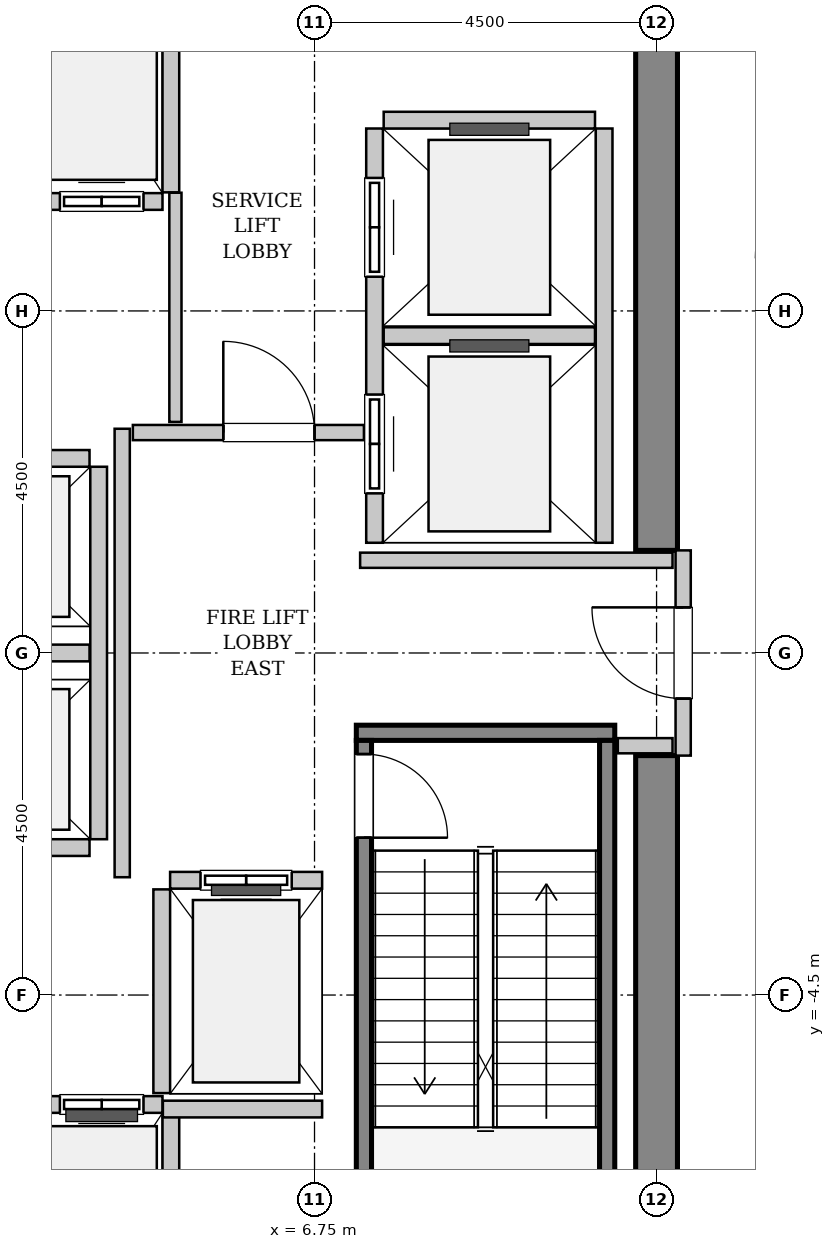
"""IFC4 building model, lengths in metres.
Left out: names, types, materials, properties, quantities, classifications, styles, units other than length and angle.
Written with IfcOpenShell. Run it as: python <this file> out.ifc"""

import sys

from ifc_helpers import new_model, si_unit, direction, frame, frame_2d, origin, place, context, subcontext, project, spatial, rectangle, extrude, source, transform, mapped, element, fill, save


model = new_model("IFC4")
c1 = context("Model", 3, precision=1e-05, world=origin(), true_north=direction((0.0, 1.0)))
c2 = subcontext(c1, "Body", "Model", "MODEL_VIEW")
j1 = project(units=[si_unit("LENGTHUNIT", "METRE"), si_unit("PLANEANGLEUNIT", "RADIAN")], contexts=[c1])
p1 = place(None, origin())
s1 = spatial("IfcSite", under=j1, at=p1, CompositionType="ELEMENT")
p2 = place(p1, origin())
s2 = spatial("IfcBuilding", under=s1, at=p2, CompositionType="ELEMENT")
p3 = place(p2, frame((0.0, 0.0, 144.0)))
s3 = spatial("IfcBuildingStorey", under=s2, at=p3, CompositionType="ELEMENT", Elevation=144.0)
m1 = source(origin(), c2, "Body", "SweptSolid", [
    extrude(rectangle(XDim=7.375, YDim=0.55, at=frame_2d((3.688, 0.0))), origin(), (0.0, 0.0, 1.0), 4.8),
])
for number, where, z_axis, x_axis in (
    (1, (11.25, -8.725, 0.0), (0.0, 0.0, 1.0), (0.0, 1.0, 0.0)),
    (2, (11.25, 1.35, 0.0), (0.0, 0.0, 1.0), (0.0, 1.0, 0.0)),
):
    element("IfcWall", number, at=place(p3, frame(where, z_axis=z_axis, x_axis=x_axis)), inside=s3, PredefinedType="SHEAR", context=c2, shape_type="MappedRepresentation", body=[
        mapped(m1, transform((0.0, 0.0, 0.0), x_axis=(1.0, 0.0, 0.0), y_axis=(0.0, 1.0, 0.0), z_axis=(0.0, 0.0, 1.0), scale=1.0)),
    ])
m2 = source(origin(), c2, "Body", "SweptSolid", [
    extrude(rectangle(XDim=3.4, YDim=0.2, at=frame_2d((1.7, 0.0))), origin(), (0.0, 0.0, 1.0), 4.8),
])
p4 = place(p3, frame((7.3, -1.05, 0.0), z_axis=(0.0, 0.0, 1.0), x_axis=(1.0, 0.0, 0.0)))
e3 = element("IfcWall", 3, at=p4, inside=s3, PredefinedType="SOLIDWALL", context=c2, shape_type="MappedRepresentation", body=[
    mapped(m2, transform((0.0, 0.0, 0.0), x_axis=(1.0, 0.0, 0.0), y_axis=(0.0, 1.0, 0.0), z_axis=(0.0, 0.0, 1.0), scale=1.0)),
])
m3 = source(origin(), c2, "Body", "SweptSolid", [
    extrude(rectangle(XDim=7.1, YDim=0.2, at=frame_2d((3.55, 0.0))), origin(), (0.0, 0.0, 1.0), 4.8),
])
p5 = place(p3, frame((7.4, -1.15, 0.0), z_axis=(0.0, 0.0, 1.0), x_axis=(0.0, -1.0, 0.0)))
e4 = element("IfcWall", 4, at=p5, inside=s3, PredefinedType="SOLIDWALL", context=c2, shape_type="MappedRepresentation", body=[
    mapped(m3, transform((0.0, 0.0, 0.0), x_axis=(1.0, 0.0, 0.0), y_axis=(0.0, 1.0, 0.0), z_axis=(0.0, 0.0, 1.0), scale=1.0)),
])
p6 = place(p5, frame((0.18, 0.0, 0.0)))
e5 = element("IfcOpeningElement", 5, at=p6, cuts=e4, PredefinedType="OPENING", context=c2, shape_type="SweptSolid", body=[
    extrude(rectangle(XDim=1.1, YDim=2.15, at=frame_2d((0.55, 1.075))), frame((0.0, 0.11, 0.0), z_axis=(0.0, -1.0, 0.0), x_axis=(1.0, 0.0, 0.0)), (0.0, 0.0, 1.0), 0.22),
])
p7 = place(p3, frame((10.6, -1.15, 0.0), z_axis=(0.0, 0.0, 1.0), x_axis=(0.0, -1.0, 0.0)))
e6 = element("IfcWall", 6, at=p7, inside=s3, PredefinedType="SOLIDWALL", context=c2, shape_type="MappedRepresentation", body=[
    mapped(m3, transform((0.0, 0.0, 0.0), x_axis=(1.0, 0.0, 0.0), y_axis=(0.0, 1.0, 0.0), z_axis=(0.0, 0.0, 1.0), scale=1.0)),
])
m4 = source(origin(), c2, "Body", "SweptSolid", [
    extrude(rectangle(XDim=2.0, YDim=0.22, at=frame_2d((1.0, 0.0))), origin(), (0.0, 0.0, 1.0), 4.535),
])
p8 = place(p3, frame((6.85, -2.99, 0.0), z_axis=(0.0, 0.0, 1.0), x_axis=(-1.0, 0.0, 0.0)))
e7 = element("IfcWall", 7, at=p8, inside=s3, PredefinedType="SOLIDWALL", context=c2, shape_type="MappedRepresentation", body=[
    mapped(m4, transform((0.0, 0.0, 0.0), x_axis=(1.0, 0.0, 0.0), y_axis=(0.0, 1.0, 0.0), z_axis=(0.0, 0.0, 1.0), scale=1.0)),
])
p9 = place(p8, frame((0.4, 0.0, 0.0)))
e8 = element("IfcOpeningElement", 8, at=p9, cuts=e7, PredefinedType="OPENING", context=c2, shape_type="SweptSolid", body=[
    extrude(rectangle(XDim=1.2, YDim=2.2, at=frame_2d((0.6, 1.1))), frame((0.0, 0.12, 0.0), z_axis=(0.0, -1.0, 0.0), x_axis=(1.0, 0.0, 0.0)), (0.0, 0.0, 1.0), 0.24),
])
m5 = source(origin(), c2, "Body", "SweptSolid", [
    extrude(rectangle(XDim=2.68, YDim=0.22, at=frame_2d((1.34, 0.0))), origin(), (0.0, 0.0, 1.0), 4.535),
])
p10 = place(p3, frame((4.74, -3.11, 0.0), z_axis=(0.0, 0.0, 1.0), x_axis=(0.0, -1.0, 0.0)))
e9 = element("IfcWall", 9, at=p10, inside=s3, PredefinedType="SOLIDWALL", context=c2, shape_type="MappedRepresentation", body=[
    mapped(m5, transform((0.0, 0.0, 0.0), x_axis=(1.0, 0.0, 0.0), y_axis=(0.0, 1.0, 0.0), z_axis=(0.0, 0.0, 1.0), scale=1.0)),
])
m6 = source(origin(), c2, "Body", "SweptSolid", [
    extrude(rectangle(XDim=5.45, YDim=0.22, at=frame_2d((2.725, 0.0))), origin(), (0.0, 0.0, 1.0), 4.535),
])
p11 = place(p3, frame((7.54, 6.9, 0.0), z_axis=(0.0, 0.0, 1.0), x_axis=(0.0, -1.0, 0.0)))
e10 = element("IfcWall", 10, at=p11, inside=s3, PredefinedType="SOLIDWALL", context=c2, shape_type="MappedRepresentation", body=[
    mapped(m6, transform((0.0, 0.0, 0.0), x_axis=(1.0, 0.0, 0.0), y_axis=(0.0, 1.0, 0.0), z_axis=(0.0, 0.0, 1.0), scale=1.0)),
])
p12 = place(p11, frame((3.5, 0.0, 0.0)))
e11 = element("IfcOpeningElement", 11, at=p12, cuts=e10, PredefinedType="OPENING", context=c2, shape_type="SweptSolid", body=[
    extrude(rectangle(XDim=1.3, YDim=2.3, at=frame_2d((0.65, 1.15))), frame((0.0, 0.12, 0.0), z_axis=(0.0, -1.0, 0.0), x_axis=(1.0, 0.0, 0.0)), (0.0, 0.0, 1.0), 0.24),
])
p13 = place(p11, frame((0.65, 0.0, 0.0)))
e12 = element("IfcOpeningElement", 12, at=p13, cuts=e10, PredefinedType="OPENING", context=c2, shape_type="SweptSolid", body=[
    extrude(rectangle(XDim=1.3, YDim=2.3, at=frame_2d((0.65, 1.15))), frame((0.0, 0.12, 0.0), z_axis=(0.0, -1.0, 0.0), x_axis=(1.0, 0.0, 0.0)), (0.0, 0.0, 1.0), 0.24),
])
p14 = place(p3, frame((10.56, 1.45, 0.0), z_axis=(0.0, 0.0, 1.0), x_axis=(0.0, 1.0, 0.0)))
e13 = element("IfcWall", 13, at=p14, inside=s3, PredefinedType="SOLIDWALL", context=c2, shape_type="MappedRepresentation", body=[
    mapped(m6, transform((0.0, 0.0, 0.0), x_axis=(1.0, 0.0, 0.0), y_axis=(0.0, 1.0, 0.0), z_axis=(0.0, 0.0, 1.0), scale=1.0)),
])
m7 = source(origin(), c2, "Body", "SweptSolid", [
    extrude(rectangle(XDim=2.78, YDim=0.22, at=frame_2d((1.39, 0.0))), origin(), (0.0, 0.0, 1.0), 4.535),
])
for number, where, z_axis, x_axis in (
    (14, (7.66, 4.175, 0.0), (0.0, 0.0, 1.0), (1.0, 0.0, 0.0)),
    (15, (10.44, 7.01, 0.0), (0.0, 0.0, 1.0), (-1.0, 0.0, 0.0)),
):
    element("IfcWall", number, at=place(p3, frame(where, z_axis=z_axis, x_axis=x_axis)), inside=s3, PredefinedType="SOLIDWALL", context=c2, shape_type="MappedRepresentation", body=[
        mapped(m7, transform((0.0, 0.0, 0.0), x_axis=(1.0, 0.0, 0.0), y_axis=(0.0, 1.0, 0.0), z_axis=(0.0, 0.0, 1.0), scale=1.0)),
    ])
m8 = source(origin(), c2, "Body", "SweptSolid", [
    extrude(rectangle(XDim=3.2, YDim=0.22, at=frame_2d((1.6, 0.0))), origin(), (0.0, 0.0, 1.0), 4.535),
])
p15 = place(p3, frame((1.55, 5.94, 0.0), z_axis=(0.0, 0.0, 1.0), x_axis=(1.0, 0.0, 0.0)))
e16 = element("IfcWall", 16, at=p15, inside=s3, PredefinedType="SOLIDWALL", context=c2, shape_type="MappedRepresentation", body=[
    mapped(m8, transform((0.0, 0.0, 0.0), x_axis=(1.0, 0.0, 0.0), y_axis=(0.0, 1.0, 0.0), z_axis=(0.0, 0.0, 1.0), scale=1.0)),
])
p16 = place(p15, frame((0.225, 0.0, 0.0)))
e17 = element("IfcOpeningElement", 17, at=p16, cuts=e16, PredefinedType="OPENING", context=c2, shape_type="SweptSolid", body=[
    extrude(rectangle(XDim=1.1, YDim=2.2, at=frame_2d((0.55, 1.1))), frame((0.0, 0.12, 0.0), z_axis=(0.0, -1.0, 0.0), x_axis=(1.0, 0.0, 0.0)), (0.0, 0.0, 1.0), 0.24),
])
p17 = place(p15, frame((1.85, 0.0, 0.0)))
e18 = element("IfcOpeningElement", 18, at=p17, cuts=e16, PredefinedType="OPENING", context=c2, shape_type="SweptSolid", body=[
    extrude(rectangle(XDim=1.1, YDim=2.2, at=frame_2d((0.55, 1.1))), frame((0.0, 0.12, 0.0), z_axis=(0.0, -1.0, 0.0), x_axis=(1.0, 0.0, 0.0)), (0.0, 0.0, 1.0), 0.24),
])
m9 = source(origin(), c2, "Body", "SweptSolid", [
    extrude(rectangle(XDim=2.43, YDim=0.22, at=frame_2d((1.215, 0.0))), origin(), (0.0, 0.0, 1.0), 4.535),
])
p18 = place(p3, frame((4.86, 6.06, 0.0), z_axis=(0.0, 0.0, 1.0), x_axis=(0.0, 1.0, 0.0)))
e19 = element("IfcWall", 19, at=p18, inside=s3, PredefinedType="SOLIDWALL", context=c2, shape_type="MappedRepresentation", body=[
    mapped(m9, transform((0.0, 0.0, 0.0), x_axis=(1.0, 0.0, 0.0), y_axis=(0.0, 1.0, 0.0), z_axis=(0.0, 0.0, 1.0), scale=1.0)),
])
p19 = place(p3, frame((4.75, -5.94, 0.0), z_axis=(0.0, 0.0, 1.0), x_axis=(-1.0, 0.0, 0.0)))
e20 = element("IfcWall", 20, at=p19, inside=s3, PredefinedType="SOLIDWALL", context=c2, shape_type="MappedRepresentation", body=[
    mapped(m8, transform((0.0, 0.0, 0.0), x_axis=(1.0, 0.0, 0.0), y_axis=(0.0, 1.0, 0.0), z_axis=(0.0, 0.0, 1.0), scale=1.0)),
])
p20 = place(p19, frame((1.875, 0.0, 0.0)))
e21 = element("IfcOpeningElement", 21, at=p20, cuts=e20, PredefinedType="OPENING", context=c2, shape_type="SweptSolid", body=[
    extrude(rectangle(XDim=1.1, YDim=2.2, at=frame_2d((0.55, 1.1))), frame((0.0, 0.12, 0.0), z_axis=(0.0, -1.0, 0.0), x_axis=(1.0, 0.0, 0.0)), (0.0, 0.0, 1.0), 0.24),
])
p21 = place(p19, frame((0.25, 0.0, 0.0)))
e22 = element("IfcOpeningElement", 22, at=p21, cuts=e20, PredefinedType="OPENING", context=c2, shape_type="SweptSolid", body=[
    extrude(rectangle(XDim=1.1, YDim=2.2, at=frame_2d((0.55, 1.1))), frame((0.0, 0.12, 0.0), z_axis=(0.0, -1.0, 0.0), x_axis=(1.0, 0.0, 0.0)), (0.0, 0.0, 1.0), 0.24),
])
p22 = place(p3, frame((4.86, -8.49, 0.0), z_axis=(0.0, 0.0, 1.0), x_axis=(0.0, 1.0, 0.0)))
e23 = element("IfcWall", 23, at=p22, inside=s3, PredefinedType="SOLIDWALL", context=c2, shape_type="MappedRepresentation", body=[
    mapped(m9, transform((0.0, 0.0, 0.0), x_axis=(1.0, 0.0, 0.0), y_axis=(0.0, 1.0, 0.0), z_axis=(0.0, 0.0, 1.0), scale=1.0)),
])
m10 = source(origin(), c2, "Body", "SweptSolid", [
    extrude(rectangle(XDim=4.9, YDim=0.22, at=frame_2d((2.45, 0.0))), origin(), (0.0, 0.0, 1.0), 4.535),
])
p23 = place(p3, frame((3.91, -2.45, 0.0), z_axis=(0.0, 0.0, 1.0), x_axis=(0.0, 1.0, 0.0)))
e24 = element("IfcWall", 24, at=p23, inside=s3, PredefinedType="SOLIDWALL", context=c2, shape_type="MappedRepresentation", body=[
    mapped(m10, transform((0.0, 0.0, 0.0), x_axis=(1.0, 0.0, 0.0), y_axis=(0.0, 1.0, 0.0), z_axis=(0.0, 0.0, 1.0), scale=1.0)),
])
m11 = source(origin(), c2, "Body", "SweptSolid", [
    extrude(rectangle(XDim=2.13, YDim=0.22, at=frame_2d((1.065, 0.0))), origin(), (0.0, 0.0, 1.0), 4.535),
])
for number, where, z_axis, x_axis in (
    (25, (1.66, -2.56, 0.0), (0.0, 0.0, 1.0), (1.0, 0.0, 0.0)),
    (26, (1.66, 0.0, 0.0), (0.0, 0.0, 1.0), (1.0, 0.0, 0.0)),
    (27, (3.79, 2.56, 0.0), (0.0, 0.0, 1.0), (-1.0, 0.0, 0.0)),
):
    element("IfcWall", number, at=place(p3, frame(where, z_axis=z_axis, x_axis=x_axis)), inside=s3, PredefinedType="SOLIDWALL", context=c2, shape_type="MappedRepresentation", body=[
        mapped(m11, transform((0.0, 0.0, 0.0), x_axis=(1.0, 0.0, 0.0), y_axis=(0.0, 1.0, 0.0), z_axis=(0.0, 0.0, 1.0), scale=1.0)),
    ])
m12 = source(origin(), c2, "Body", "SweptSolid", [
    extrude(rectangle(XDim=2.095, YDim=0.22, at=frame_2d((1.048, 0.0))), origin(), (0.0, 0.0, 1.0), 4.535),
])
p24 = place(p3, frame((4.755, -6.0, 0.0), z_axis=(0.0, 0.0, 1.0), x_axis=(1.0, 0.0, 0.0)))
e28 = element("IfcWall", 28, at=p24, inside=s3, PredefinedType="SOLIDWALL", context=c2, shape_type="MappedRepresentation", body=[
    mapped(m12, transform((0.0, 0.0, 0.0), x_axis=(1.0, 0.0, 0.0), y_axis=(0.0, 1.0, 0.0), z_axis=(0.0, 0.0, 1.0), scale=1.0)),
])
m13 = source(origin(), c2, "Body", "SweptSolid", [
    extrude(rectangle(XDim=2.7, YDim=0.2, at=frame_2d((1.35, 0.0))), origin(), (0.0, 0.0, 1.0), 3.425),
])
p25 = place(p3, frame((11.6, -1.35, 0.0), z_axis=(0.0, 0.0, 1.0), x_axis=(0.0, 1.0, 0.0)))
e29 = element("IfcWall", 29, at=p25, inside=s3, PredefinedType="PARTITIONING", context=c2, shape_type="MappedRepresentation", body=[
    mapped(m13, transform((0.0, 0.0, 0.0), x_axis=(1.0, 0.0, 0.0), y_axis=(0.0, 1.0, 0.0), z_axis=(0.0, 0.0, 1.0), scale=1.0)),
])
p26 = place(p25, frame((0.75, 0.0, 0.0)))
e30 = element("IfcOpeningElement", 30, at=p26, cuts=e29, PredefinedType="OPENING", context=c2, shape_type="SweptSolid", body=[
    extrude(rectangle(XDim=1.2, YDim=2.15, at=frame_2d((0.6, 1.075))), frame((0.0, 0.11, 0.0), z_axis=(0.0, -1.0, 0.0), x_axis=(1.0, 0.0, 0.0)), (0.0, 0.0, 1.0), 0.22),
])
m14 = source(origin(), c2, "Body", "SweptSolid", [
    extrude(rectangle(XDim=5.9, YDim=0.2, at=frame_2d((2.95, 0.0))), origin(), (0.0, 0.0, 1.0), 4.535),
])
p27 = place(p3, frame((4.22, -2.95, 0.0), z_axis=(0.0, 0.0, 1.0), x_axis=(0.0, 1.0, 0.0)))
e31 = element("IfcWall", 31, at=p27, inside=s3, PredefinedType="PARTITIONING", context=c2, shape_type="MappedRepresentation", body=[
    mapped(m14, transform((0.0, 0.0, 0.0), x_axis=(1.0, 0.0, 0.0), y_axis=(0.0, 1.0, 0.0), z_axis=(0.0, 0.0, 1.0), scale=1.0)),
])
m15 = source(origin(), c2, "Body", "SweptSolid", [
    extrude(rectangle(XDim=3.04, YDim=0.2, at=frame_2d((1.52, 0.0))), origin(), (0.0, 0.0, 1.0), 4.535),
])
p28 = place(p3, frame((4.36, 2.9, 0.0), z_axis=(0.0, 0.0, 1.0), x_axis=(1.0, 0.0, 0.0)))
e32 = element("IfcWall", 32, at=p28, inside=s3, PredefinedType="PARTITIONING", context=c2, shape_type="MappedRepresentation", body=[
    mapped(m15, transform((0.0, 0.0, 0.0), x_axis=(1.0, 0.0, 0.0), y_axis=(0.0, 1.0, 0.0), z_axis=(0.0, 0.0, 1.0), scale=1.0)),
])
p29 = place(p28, frame((1.19, 0.0, 0.0)))
e33 = element("IfcOpeningElement", 33, at=p29, cuts=e32, PredefinedType="OPENING", context=c2, shape_type="SweptSolid", body=[
    extrude(rectangle(XDim=1.2, YDim=2.15, at=frame_2d((0.6, 1.075))), frame((0.0, 0.11, 0.0), z_axis=(0.0, -1.0, 0.0), x_axis=(1.0, 0.0, 0.0)), (0.0, 0.0, 1.0), 0.22),
])
m16 = source(origin(), c2, "Body", "SweptSolid", [
    extrude(rectangle(XDim=4.11, YDim=0.2, at=frame_2d((2.055, 0.0))), origin(), (0.0, 0.0, 1.0), 4.535),
])
p30 = place(p3, frame((7.35, 1.22, 0.0), z_axis=(0.0, 0.0, 1.0), x_axis=(1.0, 0.0, 0.0)))
e34 = element("IfcWall", 34, at=p30, inside=s3, PredefinedType="PARTITIONING", context=c2, shape_type="MappedRepresentation", body=[
    mapped(m16, transform((0.0, 0.0, 0.0), x_axis=(1.0, 0.0, 0.0), y_axis=(0.0, 1.0, 0.0), z_axis=(0.0, 0.0, 1.0), scale=1.0)),
])
m17 = source(origin(), c2, "Body", "SweptSolid", [
    extrude(rectangle(XDim=0.72, YDim=0.2, at=frame_2d((0.36, 0.0))), origin(), (0.0, 0.0, 1.0), 4.535),
])
p31 = place(p3, frame((10.74, -1.22, 0.0), z_axis=(0.0, 0.0, 1.0), x_axis=(1.0, 0.0, 0.0)))
e35 = element("IfcWall", 35, at=p31, inside=s3, PredefinedType="PARTITIONING", context=c2, shape_type="MappedRepresentation", body=[
    mapped(m17, transform((0.0, 0.0, 0.0), x_axis=(1.0, 0.0, 0.0), y_axis=(0.0, 1.0, 0.0), z_axis=(0.0, 0.0, 1.0), scale=1.0)),
])
m18 = source(origin(), c2, "Body", "SweptSolid", [
    extrude(rectangle(XDim=3.015, YDim=0.16, at=frame_2d((1.507, 0.0))), origin(), (0.0, 0.0, 1.0), 4.535),
])
p32 = place(p3, frame((4.92, 3.04, 0.0), z_axis=(0.0, 0.0, 1.0), x_axis=(0.0, 1.0, 0.0)))
e36 = element("IfcWall", 36, at=p32, inside=s3, PredefinedType="PARTITIONING", context=c2, shape_type="MappedRepresentation", body=[
    mapped(m18, transform((0.0, 0.0, 0.0), x_axis=(1.0, 0.0, 0.0), y_axis=(0.0, 1.0, 0.0), z_axis=(0.0, 0.0, 1.0), scale=1.0)),
])
m19 = source(origin(), c2, "Body", "SweptSolid", [
    extrude(rectangle(XDim=1.1, YDim=2.15, at=frame_2d((0.55, 1.075))), frame((0.0, 0.025, 0.0), z_axis=(0.0, -1.0, 0.0), x_axis=(1.0, 0.0, 0.0)), (0.0, 0.0, 1.0), 0.05),
])
p33 = place(p6, origin())
e37 = element("IfcDoor", 37, at=p33, inside=s3, OperationType="SINGLE_SWING_RIGHT", PredefinedType="DOOR", context=c2, shape_type="MappedRepresentation", body=[
    mapped(m19, transform((0.0, 0.0, 0.0), x_axis=(1.0, 0.0, 0.0), y_axis=(0.0, 1.0, 0.0), z_axis=(0.0, 0.0, 1.0), scale=1.0)),
])
fill(e5, e37)
m20 = source(origin(), c2, "Body", "SweptSolid", [
    extrude(rectangle(XDim=1.2, YDim=2.2, at=frame_2d((0.6, 1.1))), frame((0.0, 0.025, 0.0), z_axis=(0.0, -1.0, 0.0), x_axis=(1.0, 0.0, 0.0)), (0.0, 0.0, 1.0), 0.05),
])
p34 = place(p9, origin())
e38 = element("IfcDoor", 38, at=p34, inside=s3, OperationType="SLIDING_TO_LEFT", PredefinedType="DOOR", context=c2, shape_type="MappedRepresentation", body=[
    mapped(m20, transform((0.0, 0.0, 0.0), x_axis=(1.0, 0.0, 0.0), y_axis=(0.0, 1.0, 0.0), z_axis=(0.0, 0.0, 1.0), scale=1.0)),
])
fill(e8, e38)
m21 = source(origin(), c2, "Body", "SweptSolid", [
    extrude(rectangle(XDim=1.3, YDim=2.3, at=frame_2d((0.65, 1.15))), frame((0.0, 0.025, 0.0), z_axis=(0.0, -1.0, 0.0), x_axis=(1.0, 0.0, 0.0)), (0.0, 0.0, 1.0), 0.05),
])
p35 = place(p12, origin())
e39 = element("IfcDoor", 39, at=p35, inside=s3, OperationType="SLIDING_TO_RIGHT", PredefinedType="DOOR", context=c2, shape_type="MappedRepresentation", body=[
    mapped(m21, transform((0.0, 0.0, 0.0), x_axis=(1.0, 0.0, 0.0), y_axis=(0.0, 1.0, 0.0), z_axis=(0.0, 0.0, 1.0), scale=1.0)),
])
fill(e11, e39)
p36 = place(p13, origin())
e40 = element("IfcDoor", 40, at=p36, inside=s3, OperationType="SLIDING_TO_RIGHT", PredefinedType="DOOR", context=c2, shape_type="MappedRepresentation", body=[
    mapped(m21, transform((0.0, 0.0, 0.0), x_axis=(1.0, 0.0, 0.0), y_axis=(0.0, 1.0, 0.0), z_axis=(0.0, 0.0, 1.0), scale=1.0)),
])
fill(e12, e40)
m22 = source(origin(), c2, "Body", "SweptSolid", [
    extrude(rectangle(XDim=1.1, YDim=2.2, at=frame_2d((0.55, 1.1))), frame((0.0, 0.025, 0.0), z_axis=(0.0, -1.0, 0.0), x_axis=(1.0, 0.0, 0.0)), (0.0, 0.0, 1.0), 0.05),
])
p37 = place(p17, origin())
e41 = element("IfcDoor", 41, at=p37, inside=s3, OperationType="DOUBLE_DOOR_SLIDING", PredefinedType="DOOR", context=c2, shape_type="MappedRepresentation", body=[
    mapped(m22, transform((0.0, 0.0, 0.0), x_axis=(1.0, 0.0, 0.0), y_axis=(0.0, 1.0, 0.0), z_axis=(0.0, 0.0, 1.0), scale=1.0)),
])
fill(e18, e41)
p38 = place(p21, origin())
e42 = element("IfcDoor", 42, at=p38, inside=s3, OperationType="DOUBLE_DOOR_SLIDING", PredefinedType="DOOR", context=c2, shape_type="MappedRepresentation", body=[
    mapped(m22, transform((0.0, 0.0, 0.0), x_axis=(1.0, 0.0, 0.0), y_axis=(0.0, 1.0, 0.0), z_axis=(0.0, 0.0, 1.0), scale=1.0)),
])
fill(e22, e42)
m23 = source(origin(), c2, "Body", "SweptSolid", [
    extrude(rectangle(XDim=1.2, YDim=2.15, at=frame_2d((0.6, 1.075))), frame((0.0, 0.025, 0.0), z_axis=(0.0, -1.0, 0.0), x_axis=(1.0, 0.0, 0.0)), (0.0, 0.0, 1.0), 0.05),
])
p39 = place(p26, origin())
e43 = element("IfcDoor", 43, at=p39, inside=s3, OperationType="SINGLE_SWING_RIGHT", PredefinedType="DOOR", context=c2, shape_type="MappedRepresentation", body=[
    mapped(m23, transform((0.0, 0.0, 0.0), x_axis=(1.0, 0.0, 0.0), y_axis=(0.0, 1.0, 0.0), z_axis=(0.0, 0.0, 1.0), scale=1.0)),
])
fill(e30, e43)
p40 = place(p29, origin())
e44 = element("IfcDoor", 44, at=p40, inside=s3, OperationType="SINGLE_SWING_LEFT", PredefinedType="DOOR", context=c2, shape_type="MappedRepresentation", body=[
    mapped(m23, transform((0.0, 0.0, 0.0), x_axis=(1.0, 0.0, 0.0), y_axis=(0.0, 1.0, 0.0), z_axis=(0.0, 0.0, 1.0), scale=1.0)),
])
fill(e33, e44)
save(model, sys.argv[1])
